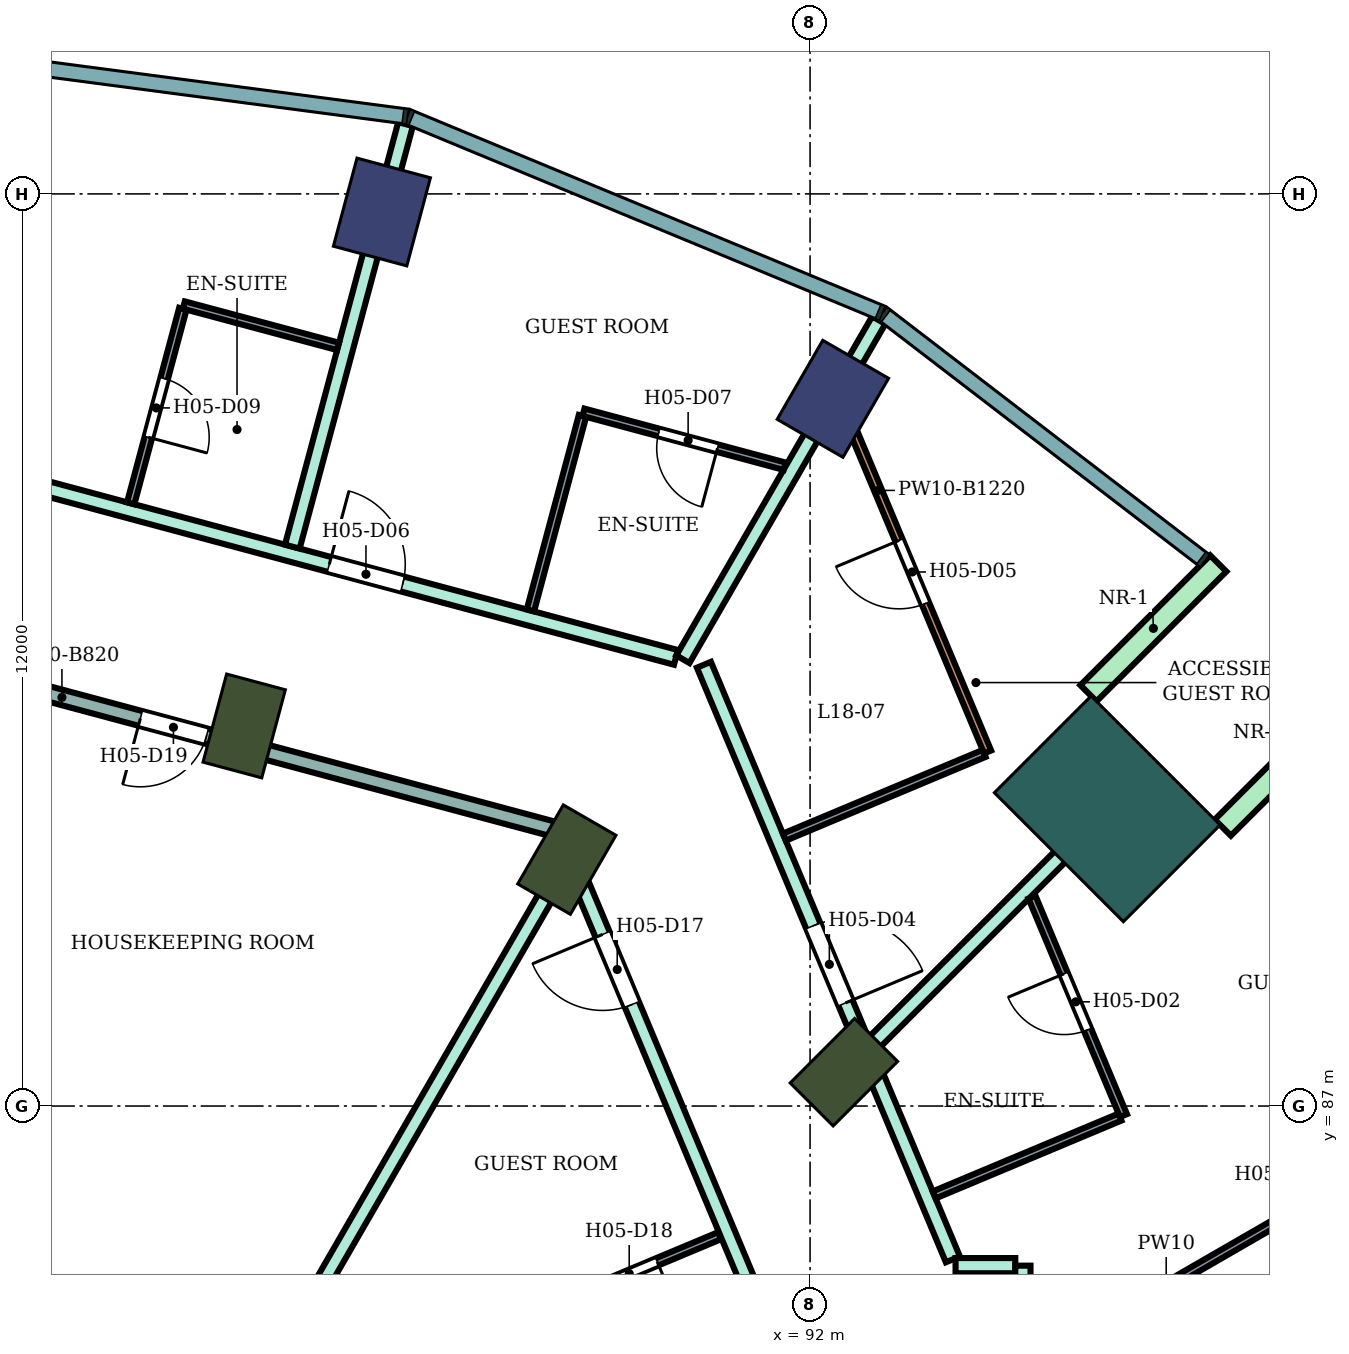
"""IFC4 building model, lengths in metres.
Left out: names, types, materials, properties, quantities, classifications, styles, units other than length and angle.
Written with IfcOpenShell. Run it as: python <this file> out.ifc"""

import sys

from ifc_helpers import new_model, si_unit, direction, frame, frame_2d, origin, origin_2d, place, context, subcontext, project, spatial, rectangle, extrude, element, fill, save


model = new_model("IFC4")
c1 = context("Model", 3, precision=1e-05, world=origin(), true_north=direction((0.0, 1.0)))
c2 = subcontext(c1, "Body", "Model", "MODEL_VIEW")
j1 = project(units=[si_unit("LENGTHUNIT", "METRE"), si_unit("PLANEANGLEUNIT", "RADIAN")], contexts=[c1])
p1 = place(None, origin())
s1 = spatial("IfcSite", under=j1, at=p1, CompositionType="ELEMENT")
p2 = place(p1, origin())
s2 = spatial("IfcBuilding", under=s1, at=p2, CompositionType="ELEMENT")
p3 = place(p2, frame((0.0, 0.0, 82.4)))
s3 = spatial("IfcBuildingStorey", under=s2, at=p3, CompositionType="ELEMENT", Elevation=82.4)
for number, where, z_axis, x_axis in (
    (1, (92.3, 96.304, 0.0), (0.0, 0.0, 1.0), (0.5, 0.866, 0.0)),
    (2, (86.367, 98.762, 0.0), (0.0, 0.0, 1.0), (0.259, 0.966, 0.0)),
):
    element("IfcColumn", number, at=place(p3, frame(where, z_axis=z_axis, x_axis=x_axis)), inside=s3, PredefinedType="COLUMN", context=c2, shape_type="SweptSolid", body=[
        extrude(rectangle(XDim=1.2, YDim=1.0, at=origin_2d()), origin(), (0.0, 0.0, 1.0), 3.8),
    ])
for number, where, z_axis, x_axis in (
    (3, (92.445, 87.445, 0.0), (0.0, 0.0, 1.0), (0.707, 0.707, 0.0)),
    (4, (88.8, 90.242, 0.0), (0.0, 0.0, 1.0), (0.5, 0.866, 0.0)),
    (5, (84.555, 92.0, 0.0), (0.0, 0.0, 1.0), (0.259, 0.966, 0.0)),
):
    element("IfcColumn", number, at=place(p3, frame(where, z_axis=z_axis, x_axis=x_axis)), inside=s3, PredefinedType="COLUMN", context=c2, shape_type="SweptSolid", body=[
        extrude(rectangle(XDim=1.2, YDim=0.8, at=origin_2d()), origin(), (0.0, 0.0, 1.0), 3.8),
    ])
p4 = place(p3, frame((95.91, 90.91, 0.0), z_axis=(0.0, 0.0, 1.0), x_axis=(0.707106781187, 0.707106781187, 0.0)))
e6 = element("IfcColumn", 6, at=p4, inside=s3, PredefinedType="COLUMN", context=c2, shape_type="SweptSolid", body=[
    extrude(rectangle(XDim=1.8, YDim=2.4, at=origin_2d()), origin(), (0.0, 0.0, 1.0), 3.8),
])
for number, where, z_axis, x_axis in (
    (7, (97.43, 90.662, 0.0), (0.0, 0.0, 1.0), (0.707, 0.707, 0.0)),
    (8, (95.662, 92.43, 0.0), (0.0, 0.0, 1.0), (0.707, 0.707, 0.0)),
):
    element("IfcWall", number, at=place(p3, frame(where, z_axis=z_axis, x_axis=x_axis)), inside=s3, PredefinedType="NOTDEFINED", context=c2, shape_type="SweptSolid", body=[
        extrude(rectangle(XDim=2.416, YDim=0.3, at=frame_2d((1.208, 0.0))), origin(), (0.0, 0.0, 1.0), 3.8),
    ])
p5 = place(p3, frame((80.0, 92.954, 0.0), z_axis=(0.0, 0.0, 1.0), x_axis=(0.965932194462, -0.258795277586, 0.0)))
e9 = element("IfcWall", 9, at=p5, inside=s3, PredefinedType="PARTITIONING", context=c2, shape_type="SweptSolid", body=[
    extrude(rectangle(XDim=8.934, YDim=0.2, at=frame_2d((4.467, 0.0))), origin(), (0.0, 0.0, 1.0), 2.98),
])
p6 = place(p5, frame((3.302, 0.0, 0.0)))
e10 = element("IfcOpeningElement", 10, at=p6, cuts=e9, PredefinedType="OPENING", context=c2, shape_type="SweptSolid", body=[
    extrude(rectangle(XDim=0.9, YDim=2.1, at=frame_2d((0.45, 1.05))), frame((0.0, 0.11, 0.0), z_axis=(0.0, -1.0, 0.0), x_axis=(1.0, 0.0, 0.0)), (0.0, 0.0, 1.0), 0.22),
])
p7 = place(p3, frame((80.0, 95.648, 0.0), z_axis=(0.0, 0.0, 1.0), x_axis=(0.965852259202, -0.259093445292, 0.0)))
e11 = element("IfcWall", 11, at=p7, inside=s3, PredefinedType="PARTITIONING", context=c2, shape_type="SweptSolid", body=[
    extrude(rectangle(XDim=10.597, YDim=0.2, at=frame_2d((5.298, 0.0))), origin(), (0.0, 0.0, 1.0), 3.35),
])
p8 = place(p7, frame((5.875, 0.0, 0.0)))
e12 = element("IfcOpeningElement", 12, at=p8, cuts=e11, PredefinedType="OPENING", context=c2, shape_type="SweptSolid", body=[
    extrude(rectangle(XDim=1.0, YDim=2.1, at=frame_2d((0.5, 1.05))), frame((0.0, 0.11, 0.0), z_axis=(0.0, -1.0, 0.0), x_axis=(1.0, 0.0, 0.0)), (0.0, 0.0, 1.0), 0.22),
])
p9 = place(p3, frame((83.85, 81.667, 0.0), z_axis=(0.0, 0.0, 1.0), x_axis=(0.500222212082, 0.865897071562, 0.0)))
e13 = element("IfcWall", 13, at=p9, inside=s3, PredefinedType="PARTITIONING", context=c2, shape_type="SweptSolid", body=[
    extrude(rectangle(XDim=9.768, YDim=0.2, at=frame_2d((4.884, 0.0))), origin(), (0.0, 0.0, 1.0), 3.35),
])
p10 = place(p3, frame((85.188, 94.36, 0.0), z_axis=(0.0, 0.0, 1.0), x_axis=(0.258882407816, 0.965908846074, 0.0)))
e14 = element("IfcWall", 14, at=p10, inside=s3, PredefinedType="PARTITIONING", context=c2, shape_type="SweptSolid", body=[
    extrude(rectangle(XDim=5.755, YDim=0.2, at=frame_2d((2.877, 0.0))), origin(), (0.0, 0.0, 1.0), 3.35),
])
p11 = place(p3, frame((88.698, 90.624, 0.0), z_axis=(0.0, 0.0, 1.0), x_axis=(0.386027055918, -0.922487459047, 0.0)))
e15 = element("IfcWall", 15, at=p11, inside=s3, PredefinedType="PARTITIONING", context=c2, shape_type="SweptSolid", body=[
    extrude(rectangle(XDim=7.832, YDim=0.2, at=frame_2d((3.916, 0.0))), origin(), (0.0, 0.0, 1.0), 3.35),
])
p12 = place(p11, frame((1.482, 0.0, 0.0)))
e16 = element("IfcOpeningElement", 16, at=p12, cuts=e15, PredefinedType="OPENING", context=c2, shape_type="SweptSolid", body=[
    extrude(rectangle(XDim=1.0, YDim=2.1, at=frame_2d((0.5, 1.05))), frame((0.0, 0.11, 0.0), z_axis=(0.0, -1.0, 0.0), x_axis=(1.0, 0.0, 0.0)), (0.0, 0.0, 1.0), 0.22),
])
p13 = place(p3, frame((90.327, 92.878, 0.0), z_axis=(0.0, 0.0, 1.0), x_axis=(0.50022153717, 0.865897461453, 0.0)))
e17 = element("IfcWall", 17, at=p13, inside=s3, PredefinedType="PARTITIONING", context=c2, shape_type="SweptSolid", body=[
    extrude(rectangle(XDim=5.152, YDim=0.2, at=frame_2d((2.576, 0.0))), origin(), (0.0, 0.0, 1.0), 3.35),
])
p14 = place(p3, frame((90.604, 92.805, 0.0), z_axis=(0.0, 0.0, 1.0), x_axis=(0.386209298583, -0.922411176042, 0.0)))
e18 = element("IfcWall", 18, at=p14, inside=s3, PredefinedType="PARTITIONING", context=c2, shape_type="SweptSolid", body=[
    extrude(rectangle(XDim=8.48, YDim=0.2, at=frame_2d((4.24, 0.0))), origin(), (0.0, 0.0, 1.0), 3.35),
])
p15 = place(p14, frame((3.723, 0.0, 0.0)))
e19 = element("IfcOpeningElement", 19, at=p15, cuts=e18, PredefinedType="OPENING", context=c2, shape_type="SweptSolid", body=[
    extrude(rectangle(XDim=1.1, YDim=2.1, at=frame_2d((0.55, 1.05))), frame((0.0, 0.11, 0.0), z_axis=(0.0, -1.0, 0.0), x_axis=(1.0, 0.0, 0.0)), (0.0, 0.0, 1.0), 0.22),
])
p16 = place(p3, frame((92.832, 87.824, 0.0), z_axis=(0.0, 0.0, 1.0), x_axis=(0.707251566381, 0.70696196634, 0.0)))
e20 = element("IfcWall", 20, at=p16, inside=s3, PredefinedType="PARTITIONING", context=c2, shape_type="SweptSolid", body=[
    extrude(rectangle(XDim=5.058, YDim=0.2, at=frame_2d((2.529, 0.0))), origin(), (0.0, 0.0, 1.0), 3.35),
])
p17 = place(p3, frame((93.914, 84.9, 0.0), z_axis=(0.0, 0.0, 1.0), x_axis=(1.0, 0.0, 0.0)))
e21 = element("IfcWall", 21, at=p17, inside=s3, PredefinedType="PARTITIONING", context=c2, shape_type="SweptSolid", body=[
    extrude(rectangle(XDim=0.786, YDim=0.2, at=frame_2d((0.393, 0.0))), origin(), (0.0, 0.0, 1.0), 3.35),
])
p18 = place(p3, frame((94.8, 83.65, 0.0), z_axis=(0.0, 0.0, 1.0), x_axis=(0.0, 1.0, 0.0)))
e22 = element("IfcWall", 22, at=p18, inside=s3, PredefinedType="PARTITIONING", context=c2, shape_type="SweptSolid", body=[
    extrude(rectangle(XDim=1.25, YDim=0.2, at=frame_2d((0.625, 0.0))), origin(), (0.0, 0.0, 1.0), 3.35),
])
p19 = place(p18, frame((0.062, 0.0, 0.0)))
e23 = element("IfcOpeningElement", 23, at=p19, cuts=e22, PredefinedType="OPENING", context=c2, shape_type="SweptSolid", body=[
    extrude(rectangle(XDim=1.0, YDim=2.1, at=frame_2d((0.5, 1.05))), frame((0.0, 0.11, 0.0), z_axis=(0.0, -1.0, 0.0), x_axis=(1.0, 0.0, 0.0)), (0.0, 0.0, 1.0), 0.22),
])
p20 = place(p3, frame((83.062, 94.929, 0.0), z_axis=(0.0, 0.0, 1.0), x_axis=(0.258889588814, 0.965906921398, 0.0)))
e24 = element("IfcWall", 24, at=p20, inside=s3, PredefinedType="PARTITIONING", context=c2, shape_type="SweptSolid", body=[
    extrude(rectangle(XDim=2.65, YDim=0.1, at=frame_2d((1.325, 0.0))), origin(), (0.0, 0.0, 1.0), 3.35),
])
p21 = place(p20, frame((0.9, 0.0, 0.0)))
e25 = element("IfcOpeningElement", 25, at=p21, cuts=e24, PredefinedType="OPENING", context=c2, shape_type="SweptSolid", body=[
    extrude(rectangle(XDim=0.8, YDim=2.1, at=frame_2d((0.4, 1.05))), frame((0.0, 0.06, 0.0), z_axis=(0.0, -1.0, 0.0), x_axis=(1.0, 0.0, 0.0)), (0.0, 0.0, 1.0), 0.12),
])
p22 = place(p3, frame((83.761, 97.538, 0.0), z_axis=(0.0, 0.0, 1.0), x_axis=(0.965871218513, -0.259022758166, 0.0)))
e26 = element("IfcWall", 26, at=p22, inside=s3, PredefinedType="PARTITIONING", context=c2, shape_type="SweptSolid", body=[
    extrude(rectangle(XDim=2.1, YDim=0.1, at=frame_2d((1.05, 0.0))), origin(), (0.0, 0.0, 1.0), 3.35),
])
p23 = place(p3, frame((88.321, 93.521, 0.0), z_axis=(0.0, 0.0, 1.0), x_axis=(0.258677737588, 0.965963678446, 0.0)))
e27 = element("IfcWall", 27, at=p23, inside=s3, PredefinedType="PARTITIONING", context=c2, shape_type="SweptSolid", body=[
    extrude(rectangle(XDim=2.649, YDim=0.1, at=frame_2d((1.325, 0.0))), origin(), (0.0, 0.0, 1.0), 3.35),
])
p24 = place(p3, frame((88.329, 84.255, 0.0), z_axis=(0.0, 0.0, 1.0), x_axis=(0.922320663728, 0.386425404522, 0.0)))
e28 = element("IfcWall", 28, at=p24, inside=s3, PredefinedType="PARTITIONING", context=c2, shape_type="SweptSolid", body=[
    extrude(rectangle(XDim=2.69, YDim=0.1, at=frame_2d((1.345, 0.0))), origin(), (0.0, 0.0, 1.0), 3.35),
])
p25 = place(p24, frame((1.0, 0.0, 0.0)))
e29 = element("IfcOpeningElement", 29, at=p25, cuts=e28, PredefinedType="OPENING", context=c2, shape_type="SweptSolid", body=[
    extrude(rectangle(XDim=0.8, YDim=2.1, at=frame_2d((0.4, 1.05))), frame((0.0, 0.06, 0.0), z_axis=(0.0, -1.0, 0.0), x_axis=(1.0, 0.0, 0.0)), (0.0, 0.0, 1.0), 0.12),
])
p26 = place(p3, frame((89.019, 96.127, 0.0), z_axis=(0.0, 0.0, 1.0), x_axis=(0.965839030583, -0.259142754101, 0.0)))
e30 = element("IfcWall", 30, at=p26, inside=s3, PredefinedType="PARTITIONING", context=c2, shape_type="SweptSolid", body=[
    extrude(rectangle(XDim=2.74, YDim=0.1, at=frame_2d((1.37, 0.0))), origin(), (0.0, 0.0, 1.0), 3.35),
])
p27 = place(p26, frame((1.026, 0.0, 0.0)))
e31 = element("IfcOpeningElement", 31, at=p27, cuts=e30, PredefinedType="OPENING", context=c2, shape_type="SweptSolid", body=[
    extrude(rectangle(XDim=0.8, YDim=2.1, at=frame_2d((0.4, 1.05))), frame((0.0, 0.06, 0.0), z_axis=(0.0, -1.0, 0.0), x_axis=(1.0, 0.0, 0.0)), (0.0, 0.0, 1.0), 0.12),
])
p28 = place(p3, frame((91.661, 90.538, 0.0), z_axis=(0.0, 0.0, 1.0), x_axis=(0.922352973625, 0.386348278169, 0.0)))
e32 = element("IfcWall", 32, at=p28, inside=s3, PredefinedType="PARTITIONING", context=c2, shape_type="SweptSolid", body=[
    extrude(rectangle(XDim=2.85, YDim=0.1, at=frame_2d((1.425, 0.0))), origin(), (0.0, 0.0, 1.0), 3.35),
])
p29 = place(p3, frame((92.414, 96.246, 0.0), z_axis=(0.0, 0.0, 1.0), x_axis=(0.386353683992, -0.922350709256, 0.0)))
e33 = element("IfcWall", 33, at=p29, inside=s3, PredefinedType="PARTITIONING", context=c2, shape_type="SweptSolid", body=[
    extrude(rectangle(XDim=4.974, YDim=0.1, at=frame_2d((2.487, 0.0))), origin(), (0.0, 0.0, 1.0), 2.58),
])
p30 = place(p29, frame((1.957, 0.0, 0.0)))
e34 = element("IfcOpeningElement", 34, at=p30, cuts=e33, PredefinedType="OPENING", context=c2, shape_type="SweptSolid", body=[
    extrude(rectangle(XDim=0.9, YDim=2.1, at=frame_2d((0.45, 1.05))), frame((0.0, 0.06, 0.0), z_axis=(0.0, -1.0, 0.0), x_axis=(1.0, 0.0, 0.0)), (0.0, 0.0, 1.0), 0.12),
])
p31 = place(p3, frame((93.633, 85.831, 0.0), z_axis=(0.0, 0.0, 1.0), x_axis=(0.922344808264, 0.38636777126, 0.0)))
e35 = element("IfcWall", 35, at=p31, inside=s3, PredefinedType="PARTITIONING", context=c2, shape_type="SweptSolid", body=[
    extrude(rectangle(XDim=2.65, YDim=0.1, at=frame_2d((1.325, 0.0))), origin(), (0.0, 0.0, 1.0), 3.35),
])
p32 = place(p3, frame((94.8, 83.545, 0.0), z_axis=(0.0, 0.0, 1.0), x_axis=(0.86602264145, 0.500004784474, 0.0)))
e36 = element("IfcWall", 36, at=p32, inside=s3, PredefinedType="PARTITIONING", context=c2, shape_type="SweptSolid", body=[
    extrude(rectangle(XDim=8.708, YDim=0.1, at=frame_2d((4.354, 0.0))), origin(), (0.0, 0.0, 1.0), 3.35),
])
p33 = place(p32, frame((3.879, 0.0, 0.0)))
e37 = element("IfcOpeningElement", 37, at=p33, cuts=e36, PredefinedType="OPENING", context=c2, shape_type="SweptSolid", body=[
    extrude(rectangle(XDim=0.9, YDim=2.1, at=frame_2d((0.45, 1.05))), frame((0.0, 0.06, 0.0), z_axis=(0.0, -1.0, 0.0), x_axis=(1.0, 0.0, 0.0)), (0.0, 0.0, 1.0), 0.12),
])
p34 = place(p3, frame((94.919, 89.748, 0.0), z_axis=(0.0, 0.0, 1.0), x_axis=(0.38635048828, -0.922352047868, 0.0)))
e38 = element("IfcWall", 38, at=p34, inside=s3, PredefinedType="PARTITIONING", context=c2, shape_type="SweptSolid", body=[
    extrude(rectangle(XDim=3.116, YDim=0.1, at=frame_2d((1.558, 0.0))), origin(), (0.0, 0.0, 1.0), 3.35),
])
p35 = place(p34, frame((1.093, 0.0, 0.0)))
e39 = element("IfcOpeningElement", 39, at=p35, cuts=e38, PredefinedType="OPENING", context=c2, shape_type="SweptSolid", body=[
    extrude(rectangle(XDim=0.8, YDim=2.1, at=frame_2d((0.4, 1.05))), frame((0.0, 0.06, 0.0), z_axis=(0.0, -1.0, 0.0), x_axis=(1.0, 0.0, 0.0)), (0.0, 0.0, 1.0), 0.12),
])
p36 = place(p35, frame((0.8, 0.0, 0.0), z_axis=(0.0, 0.0, 1.0), x_axis=(-1.0, 0.0, 0.0)))
e40 = element("IfcDoor", 40, at=p36, inside=s3, OperationType="SINGLE_SWING_RIGHT", PredefinedType="DOOR", context=c2, shape_type="SweptSolid", body=[
    extrude(rectangle(XDim=0.8, YDim=2.1, at=frame_2d((0.4, 1.05))), frame((0.0, 0.025, 0.0), z_axis=(0.0, -1.0, 0.0), x_axis=(1.0, 0.0, 0.0)), (0.0, 0.0, 1.0), 0.05),
])
fill(e39, e40)
p37 = place(p15, origin())
e41 = element("IfcDoor", 41, at=p37, inside=s3, OperationType="SINGLE_SWING_RIGHT", PredefinedType="DOOR", context=c2, shape_type="SweptSolid", body=[
    extrude(rectangle(XDim=1.1, YDim=2.1, at=frame_2d((0.55, 1.05))), frame((0.0, 0.025, 0.0), z_axis=(0.0, -1.0, 0.0), x_axis=(1.0, 0.0, 0.0)), (0.0, 0.0, 1.0), 0.05),
])
fill(e19, e41)
p38 = place(p30, frame((0.9, 0.0, 0.0), z_axis=(0.0, 0.0, 1.0), x_axis=(-1.0, 0.0, 0.0)))
e42 = element("IfcDoor", 42, at=p38, inside=s3, OperationType="SINGLE_SWING_RIGHT", PredefinedType="DOOR", context=c2, shape_type="SweptSolid", body=[
    extrude(rectangle(XDim=0.9, YDim=2.1, at=frame_2d((0.45, 1.05))), frame((0.0, 0.025, 0.0), z_axis=(0.0, -1.0, 0.0), x_axis=(1.0, 0.0, 0.0)), (0.0, 0.0, 1.0), 0.05),
])
fill(e34, e42)
p39 = place(p8, origin())
e43 = element("IfcDoor", 43, at=p39, inside=s3, OperationType="SINGLE_SWING_LEFT", PredefinedType="DOOR", context=c2, shape_type="SweptSolid", body=[
    extrude(rectangle(XDim=1.0, YDim=2.1, at=frame_2d((0.5, 1.05))), frame((0.0, 0.025, 0.0), z_axis=(0.0, -1.0, 0.0), x_axis=(1.0, 0.0, 0.0)), (0.0, 0.0, 1.0), 0.05),
])
fill(e12, e43)
p40 = place(p27, frame((0.8, 0.0, 0.0), z_axis=(0.0, 0.0, 1.0), x_axis=(-1.0, 0.0, 0.0)))
e44 = element("IfcDoor", 44, at=p40, inside=s3, OperationType="SINGLE_SWING_LEFT", PredefinedType="DOOR", context=c2, shape_type="SweptSolid", body=[
    extrude(rectangle(XDim=0.8, YDim=2.1, at=frame_2d((0.4, 1.05))), frame((0.0, 0.025, 0.0), z_axis=(0.0, -1.0, 0.0), x_axis=(1.0, 0.0, 0.0)), (0.0, 0.0, 1.0), 0.05),
])
fill(e31, e44)
p41 = place(p21, frame((0.8, 0.0, 0.0), z_axis=(0.0, 0.0, 1.0), x_axis=(-1.0, 0.0, 0.0)))
e45 = element("IfcDoor", 45, at=p41, inside=s3, OperationType="SINGLE_SWING_RIGHT", PredefinedType="DOOR", context=c2, shape_type="SweptSolid", body=[
    extrude(rectangle(XDim=0.8, YDim=2.1, at=frame_2d((0.4, 1.05))), frame((0.0, 0.025, 0.0), z_axis=(0.0, -1.0, 0.0), x_axis=(1.0, 0.0, 0.0)), (0.0, 0.0, 1.0), 0.05),
])
fill(e25, e45)
p42 = place(p12, frame((1.0, 0.0, 0.0), z_axis=(0.0, 0.0, 1.0), x_axis=(-1.0, 0.0, 0.0)))
e46 = element("IfcDoor", 46, at=p42, inside=s3, OperationType="SINGLE_SWING_RIGHT", PredefinedType="DOOR", context=c2, shape_type="SweptSolid", body=[
    extrude(rectangle(XDim=1.0, YDim=2.1, at=frame_2d((0.5, 1.05))), frame((0.0, 0.025, 0.0), z_axis=(0.0, -1.0, 0.0), x_axis=(1.0, 0.0, 0.0)), (0.0, 0.0, 1.0), 0.05),
])
fill(e16, e46)
p43 = place(p25, frame((0.8, 0.0, 0.0), z_axis=(0.0, 0.0, 1.0), x_axis=(-1.0, 0.0, 0.0)))
e47 = element("IfcDoor", 47, at=p43, inside=s3, OperationType="SINGLE_SWING_LEFT", PredefinedType="DOOR", context=c2, shape_type="SweptSolid", body=[
    extrude(rectangle(XDim=0.8, YDim=2.1, at=frame_2d((0.4, 1.05))), frame((0.0, 0.025, 0.0), z_axis=(0.0, -1.0, 0.0), x_axis=(1.0, 0.0, 0.0)), (0.0, 0.0, 1.0), 0.05),
])
fill(e29, e47)
p44 = place(p6, frame((0.9, 0.0, 0.0), z_axis=(0.0, 0.0, 1.0), x_axis=(-1.0, 0.0, 0.0)))
e48 = element("IfcDoor", 48, at=p44, inside=s3, OperationType="SINGLE_SWING_RIGHT", PredefinedType="DOOR", context=c2, shape_type="SweptSolid", body=[
    extrude(rectangle(XDim=0.9, YDim=2.1, at=frame_2d((0.45, 1.05))), frame((0.0, 0.025, 0.0), z_axis=(0.0, -1.0, 0.0), x_axis=(1.0, 0.0, 0.0)), (0.0, 0.0, 1.0), 0.05),
])
fill(e10, e48)
save(model, sys.argv[1])
